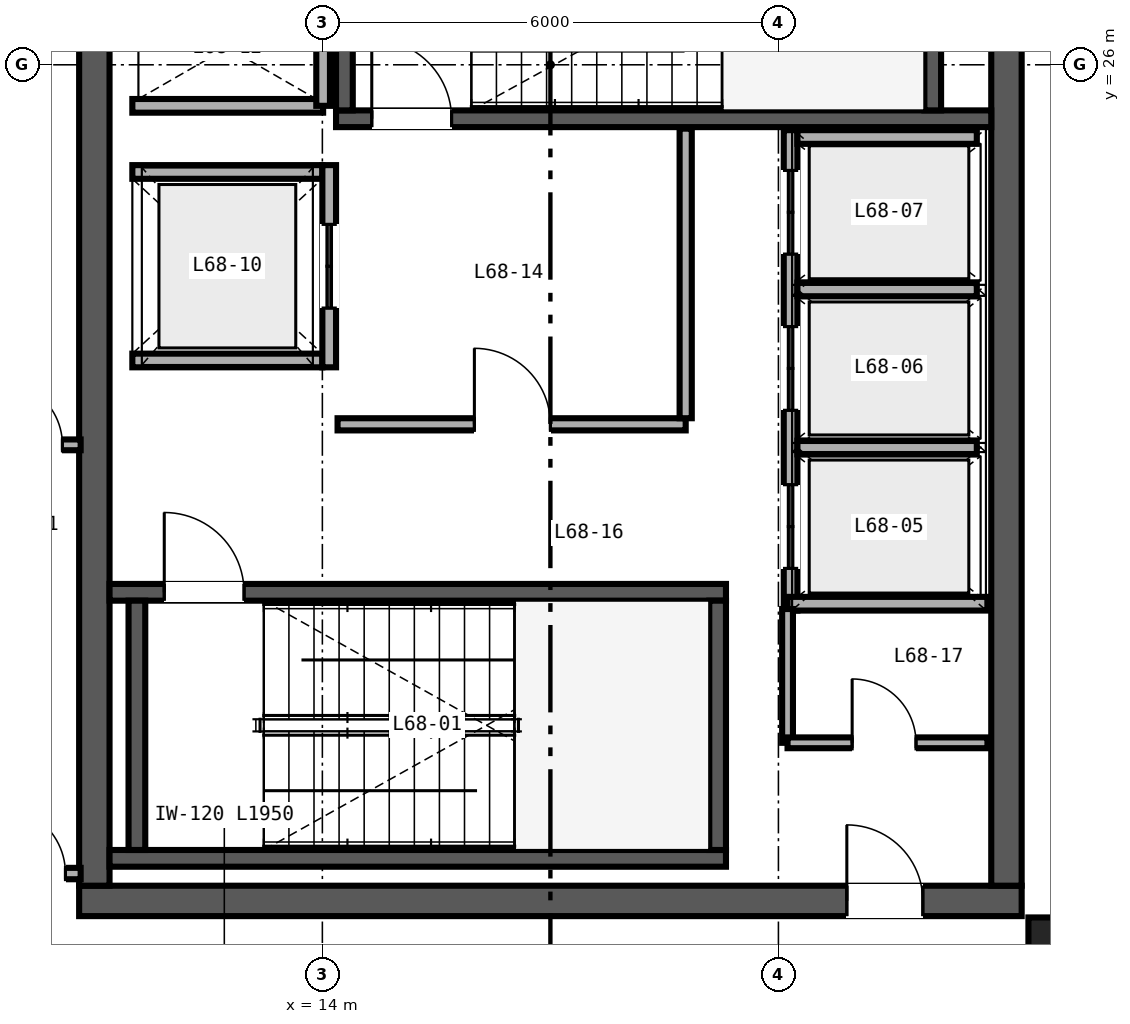
"""IFC4 building model, lengths in metres.
Left out: names, types, materials, properties, quantities, classifications, styles, units other than length and angle.
Written with IfcOpenShell. Run it as: python <this file> out.ifc"""

import sys

from ifc_helpers import new_model, si_unit, direction, frame, frame_2d, origin, origin_2d, place, context, subcontext, project, spatial, rectangle, i_section, extrude, source, transform, mapped, element, fill, save


model = new_model("IFC4")
c1 = context("Model", 3, precision=1e-05, world=origin(), true_north=direction((0.0, 1.0)))
c2 = subcontext(c1, "Body", "Model", "MODEL_VIEW")
j1 = project(units=[si_unit("LENGTHUNIT", "METRE"), si_unit("PLANEANGLEUNIT", "RADIAN")], contexts=[c1])
p1 = place(None, origin())
s1 = spatial("IfcSite", under=j1, at=p1, CompositionType="ELEMENT")
p2 = place(p1, origin())
s2 = spatial("IfcBuilding", under=s1, at=p2, CompositionType="ELEMENT")
p3 = place(p2, frame((0.0, 0.0, 268.8)))
s3 = spatial("IfcBuildingStorey", under=s2, at=p3, CompositionType="ELEMENT", Elevation=268.8)
p4 = place(p3, frame((10.8, 15.0, 0.0), z_axis=(0.0, 0.0, 1.0), x_axis=(1.0, 0.0, 0.0)))
e1 = element("IfcWall", 1, at=p4, inside=s3, PredefinedType="SHEAR", context=c2, shape_type="SweptSolid", body=[
    extrude(rectangle(XDim=12.4, YDim=0.4, at=frame_2d((6.2, 0.0))), origin(), (0.0, 0.0, 1.0), 3.28),
])
p5 = place(p4, frame((10.1, 0.0, 0.0)))
e2 = element("IfcOpeningElement", 2, at=p5, cuts=e1, PredefinedType="OPENING", context=c2, shape_type="SweptSolid", body=[
    extrude(rectangle(XDim=1.0, YDim=2.15, at=frame_2d((0.5, 1.075))), frame((0.0, 0.21, 0.0), z_axis=(0.0, -1.0, 0.0), x_axis=(1.0, 0.0, 0.0)), (0.0, 0.0, 1.0), 0.42),
])
for number, where, z_axis, x_axis in (
    (3, (11.0, 15.2, 0.0), (0.0, 0.0, 1.0), (0.0, 1.0, 0.0)),
    (4, (23.0, 15.2, 0.0), (0.0, 0.0, 1.0), (0.0, 1.0, 0.0)),
):
    element("IfcWall", number, at=place(p3, frame(where, z_axis=z_axis, x_axis=x_axis)), inside=s3, PredefinedType="SHEAR", context=c2, shape_type="SweptSolid", body=[
        extrude(rectangle(XDim=21.6, YDim=0.4, at=frame_2d((10.8, 0.0))), origin(), (0.0, 0.0, 1.0), 3.28),
    ])
p6 = place(p3, frame((11.2, 15.56, 0.0), z_axis=(0.0, 0.0, 1.0), x_axis=(1.0, 0.0, 0.0)))
e5 = element("IfcWall", 5, at=p6, inside=s3, PredefinedType="SHEAR", context=c2, shape_type="SweptSolid", body=[
    extrude(rectangle(XDim=8.11, YDim=0.22, at=frame_2d((4.055, 0.0))), origin(), (0.0, 0.0, 1.0), 3.4),
])
p7 = place(p3, frame((11.2, 19.06, 0.0), z_axis=(0.0, 0.0, 1.0), x_axis=(1.0, 0.0, 0.0)))
e6 = element("IfcWall", 6, at=p7, inside=s3, PredefinedType="SHEAR", context=c2, shape_type="SweptSolid", body=[
    extrude(rectangle(XDim=8.11, YDim=0.22, at=frame_2d((4.055, 0.0))), origin(), (0.0, 0.0, 1.0), 3.4),
])
p8 = place(p7, frame((0.72, 0.0, 0.0)))
e7 = element("IfcOpeningElement", 7, at=p8, cuts=e6, PredefinedType="OPENING", context=c2, shape_type="SweptSolid", body=[
    extrude(rectangle(XDim=1.05, YDim=2.15, at=frame_2d((0.525, 1.075))), frame((0.0, 0.12, 0.0), z_axis=(0.0, -1.0, 0.0), x_axis=(1.0, 0.0, 0.0)), (0.0, 0.0, 1.0), 0.24),
])
for number, where, z_axis, x_axis in (
    (8, (11.56, 15.67, 0.0), (0.0, 0.0, 1.0), (0.0, 1.0, 0.0)),
    (9, (19.2, 15.67, 0.0), (0.0, 0.0, 1.0), (0.0, 1.0, 0.0)),
):
    element("IfcWall", number, at=place(p3, frame(where, z_axis=z_axis, x_axis=x_axis)), inside=s3, PredefinedType="SHEAR", context=c2, shape_type="SweptSolid", body=[
        extrude(rectangle(XDim=3.28, YDim=0.22, at=frame_2d((1.64, 0.0))), origin(), (0.0, 0.0, 1.0), 3.4),
    ])
p9 = place(p3, frame((14.18, 25.29, 0.0), z_axis=(0.0, 0.0, 1.0), x_axis=(1.0, 0.0, 0.0)))
e10 = element("IfcWall", 10, at=p9, inside=s3, PredefinedType="SHEAR", context=c2, shape_type="SweptSolid", body=[
    extrude(rectangle(XDim=8.62, YDim=0.22, at=frame_2d((4.31, 0.0))), origin(), (0.0, 0.0, 1.0), 3.4),
])
p10 = place(p9, frame((0.47, 0.0, 0.0)))
e11 = element("IfcOpeningElement", 11, at=p10, cuts=e10, PredefinedType="OPENING", context=c2, shape_type="SweptSolid", body=[
    extrude(rectangle(XDim=1.05, YDim=2.15, at=frame_2d((0.525, 1.075))), frame((0.0, 0.12, 0.0), z_axis=(0.0, -1.0, 0.0), x_axis=(1.0, 0.0, 0.0)), (0.0, 0.0, 1.0), 0.24),
])
for number, where, z_axis, x_axis in (
    (12, (14.29, 25.4, 0.0), (0.0, 0.0, 1.0), (0.0, 1.0, 0.0)),
    (13, (22.03, 25.4, 0.0), (0.0, 0.0, 1.0), (0.0, 1.0, 0.0)),
):
    element("IfcWall", number, at=place(p3, frame(where, z_axis=z_axis, x_axis=x_axis)), inside=s3, PredefinedType="SHEAR", context=c2, shape_type="SweptSolid", body=[
        extrude(rectangle(XDim=3.28, YDim=0.22, at=frame_2d((1.64, 0.0))), origin(), (0.0, 0.0, 1.0), 3.4),
    ])
m1 = source(origin(), c2, "Body", "SweptSolid", [
    extrude(i_section(OverallWidth=0.422, OverallDepth=0.465, WebThickness=0.045, FlangeThickness=0.073, FilletRadius=0.025, at=origin_2d()), origin(), (0.0, 0.0, 1.0), 3.28),
])
p11 = place(p3, frame((23.5, 14.55, 0.0), z_axis=(0.0, 0.0, 1.0), x_axis=(1.0, 0.0, 0.0)))
e14 = element("IfcColumn", 14, at=p11, inside=s3, PredefinedType="COLUMN", context=c2, shape_type="MappedRepresentation", body=[
    mapped(m1, transform((0.0, 0.0, 0.0), scale=1.0)),
])
p12 = place(p3, frame((20.16, 18.82, 0.0), z_axis=(0.0, 0.0, 1.0), x_axis=(0.0, 1.0, 0.0)))
e15 = element("IfcWall", 15, at=p12, inside=s3, PredefinedType="SOLIDWALL", context=c2, shape_type="SweptSolid", body=[
    extrude(rectangle(XDim=6.32, YDim=0.18, at=frame_2d((3.16, 0.0))), origin(), (0.0, 0.0, 1.0), 2.38),
])
p13 = place(p12, frame((0.555, 0.0, 0.0)))
e16 = element("IfcOpeningElement", 16, at=p13, cuts=e15, PredefinedType="OPENING", context=c2, shape_type="SweptSolid", body=[
    extrude(rectangle(XDim=1.1, YDim=2.2, at=frame_2d((0.55, 1.1))), frame((0.0, 0.1, 0.0), z_axis=(0.0, -1.0, 0.0), x_axis=(1.0, 0.0, 0.0)), (0.0, 0.0, 1.0), 0.2),
])
p14 = place(p12, frame((2.635, 0.0, 0.0)))
e17 = element("IfcOpeningElement", 17, at=p14, cuts=e15, PredefinedType="OPENING", context=c2, shape_type="SweptSolid", body=[
    extrude(rectangle(XDim=1.1, YDim=2.2, at=frame_2d((0.55, 1.1))), frame((0.0, 0.1, 0.0), z_axis=(0.0, -1.0, 0.0), x_axis=(1.0, 0.0, 0.0)), (0.0, 0.0, 1.0), 0.2),
])
p15 = place(p12, frame((4.69, 0.0, 0.0)))
e18 = element("IfcOpeningElement", 18, at=p15, cuts=e15, PredefinedType="OPENING", context=c2, shape_type="SweptSolid", body=[
    extrude(rectangle(XDim=1.1, YDim=2.2, at=frame_2d((0.55, 1.1))), frame((0.0, 0.1, 0.0), z_axis=(0.0, -1.0, 0.0), x_axis=(1.0, 0.0, 0.0)), (0.0, 0.0, 1.0), 0.2),
])
p16 = place(p3, frame((20.12, 18.91, 0.0), z_axis=(0.0, 0.0, 1.0), x_axis=(1.0, 0.0, 0.0)))
e19 = element("IfcWall", 19, at=p16, inside=s3, PredefinedType="SOLIDWALL", context=c2, shape_type="SweptSolid", body=[
    extrude(rectangle(XDim=2.63, YDim=0.18, at=frame_2d((1.315, 0.0))), origin(), (0.0, 0.0, 1.0), 3.28),
])
p17 = place(p3, frame((20.25, 25.05, 0.0), z_axis=(0.0, 0.0, 1.0), x_axis=(1.0, 0.0, 0.0)))
e20 = element("IfcWall", 20, at=p17, inside=s3, PredefinedType="SOLIDWALL", context=c2, shape_type="SweptSolid", body=[
    extrude(rectangle(XDim=2.36, YDim=0.18, at=frame_2d((1.18, 0.0))), origin(), (0.0, 0.0, 1.0), 3.28),
])
p18 = place(p3, frame((20.25, 20.965, 0.0), z_axis=(0.0, 0.0, 1.0), x_axis=(1.0, 0.0, 0.0)))
e21 = element("IfcWall", 21, at=p18, inside=s3, PredefinedType="SOLIDWALL", context=c2, shape_type="SweptSolid", body=[
    extrude(rectangle(XDim=2.36, YDim=0.18, at=frame_2d((1.18, 0.0))), origin(), (0.0, 0.0, 1.0), 2.38),
])
p19 = place(p3, frame((20.25, 23.045, 0.0), z_axis=(0.0, 0.0, 1.0), x_axis=(1.0, 0.0, 0.0)))
e22 = element("IfcWall", 22, at=p19, inside=s3, PredefinedType="SOLIDWALL", context=c2, shape_type="SweptSolid", body=[
    extrude(rectangle(XDim=2.36, YDim=0.18, at=frame_2d((1.18, 0.0))), origin(), (0.0, 0.0, 1.0), 3.28),
])
for number, where, z_axis, x_axis in (
    (23, (11.5, 22.11, 0.0), (0.0, 0.0, 1.0), (1.0, 0.0, 0.0)),
    (24, (11.5, 24.59, 0.0), (0.0, 0.0, 1.0), (1.0, 0.0, 0.0)),
):
    element("IfcWall", number, at=place(p3, frame(where, z_axis=z_axis, x_axis=x_axis)), inside=s3, PredefinedType="SOLIDWALL", context=c2, shape_type="SweptSolid", body=[
        extrude(rectangle(XDim=2.5, YDim=0.18, at=frame_2d((1.25, 0.0))), origin(), (0.0, 0.0, 1.0), 3.28),
    ])
p20 = place(p3, frame((14.09, 22.02, 0.0), z_axis=(0.0, 0.0, 1.0), x_axis=(0.0, 1.0, 0.0)))
e25 = element("IfcWall", 25, at=p20, inside=s3, PredefinedType="SOLIDWALL", context=c2, shape_type="SweptSolid", body=[
    extrude(rectangle(XDim=2.66, YDim=0.18, at=frame_2d((1.33, 0.0))), origin(), (0.0, 0.0, 1.0), 3.28),
])
p21 = place(p20, frame((0.78, 0.0, 0.0)))
e26 = element("IfcOpeningElement", 26, at=p21, cuts=e25, PredefinedType="OPENING", context=c2, shape_type="SweptSolid", body=[
    extrude(rectangle(XDim=1.1, YDim=2.2, at=frame_2d((0.55, 1.1))), frame((0.0, 0.1, 0.0), z_axis=(0.0, -1.0, 0.0), x_axis=(1.0, 0.0, 0.0)), (0.0, 0.0, 1.0), 0.2),
])
p22 = place(p3, frame((11.5, 25.46, 0.0), z_axis=(0.0, 0.0, 1.0), x_axis=(1.0, 0.0, 0.0)))
e27 = element("IfcWall", 27, at=p22, inside=s3, PredefinedType="SOLIDWALL", context=c2, shape_type="SweptSolid", body=[
    extrude(rectangle(XDim=2.51, YDim=0.18, at=frame_2d((1.255, 0.0))), origin(), (0.0, 0.0, 1.0), 3.28),
])
p23 = place(p3, frame((14.01, 25.46, 0.0), z_axis=(0.0, 0.0, 1.0), x_axis=(0.0, 1.0, 0.0)))
e28 = element("IfcWall", 28, at=p23, inside=s3, PredefinedType="SOLIDWALL", context=c2, shape_type="SweptSolid", body=[
    extrude(rectangle(XDim=3.08, YDim=0.18, at=frame_2d((1.54, 0.0))), origin(), (0.0, 0.0, 1.0), 3.28),
])
p24 = place(p3, frame((14.2, 21.27, 0.0), z_axis=(0.0, 0.0, 1.0), x_axis=(1.0, 0.0, 0.0)))
e29 = element("IfcWall", 29, at=p24, inside=s3, PredefinedType="PARTITIONING", context=c2, shape_type="SweptSolid", body=[
    extrude(rectangle(XDim=4.58, YDim=0.16, at=frame_2d((2.29, 0.0))), origin(), (0.0, 0.0, 1.0), 3.28),
])
p25 = place(p24, frame((1.8, 0.0, 0.0)))
e30 = element("IfcOpeningElement", 30, at=p25, cuts=e29, PredefinedType="OPENING", context=c2, shape_type="SweptSolid", body=[
    extrude(rectangle(XDim=1.0, YDim=2.15, at=frame_2d((0.5, 1.075))), frame((0.0, 0.09, 0.0), z_axis=(0.0, -1.0, 0.0), x_axis=(1.0, 0.0, 0.0)), (0.0, 0.0, 1.0), 0.18),
])
p26 = place(p3, frame((18.78, 21.35, 0.0), z_axis=(0.0, 0.0, 1.0), x_axis=(0.0, 1.0, 0.0)))
e31 = element("IfcWall", 31, at=p26, inside=s3, PredefinedType="PARTITIONING", context=c2, shape_type="SweptSolid", body=[
    extrude(rectangle(XDim=3.81, YDim=0.16, at=frame_2d((1.905, 0.0))), origin(), (0.0, 0.0, 1.0), 3.28),
])
p27 = place(p3, frame((20.12, 17.08, 0.0), z_axis=(0.0, 0.0, 1.0), x_axis=(0.0, 1.0, 0.0)))
e32 = element("IfcWall", 32, at=p27, inside=s3, PredefinedType="PARTITIONING", context=c2, shape_type="SweptSolid", body=[
    extrude(rectangle(XDim=1.76, YDim=0.142, at=frame_2d((0.88, 0.0))), origin(), (0.0, 0.0, 1.0), 3.28),
])
p28 = place(p3, frame((20.12, 17.08, 0.0), z_axis=(0.0, 0.0, 1.0), x_axis=(1.0, 0.0, 0.0)))
e33 = element("IfcWall", 33, at=p28, inside=s3, PredefinedType="PARTITIONING", context=c2, shape_type="SweptSolid", body=[
    extrude(rectangle(XDim=2.63, YDim=0.142, at=frame_2d((1.315, 0.0))), origin(), (0.0, 0.0, 1.0), 3.28),
])
p29 = place(p28, frame((0.85, 0.0, 0.0)))
e34 = element("IfcOpeningElement", 34, at=p29, cuts=e33, PredefinedType="OPENING", context=c2, shape_type="SweptSolid", body=[
    extrude(rectangle(XDim=0.84, YDim=2.1, at=frame_2d((0.42, 1.05))), frame((0.0, 0.081, 0.0), z_axis=(0.0, -1.0, 0.0), x_axis=(1.0, 0.0, 0.0)), (0.0, 0.0, 1.0), 0.162),
])
p30 = place(p3, frame((8.16, 15.36, 0.0), z_axis=(0.0, 0.0, 1.0), x_axis=(1.0, 0.0, 0.0)))
e35 = element("IfcWall", 35, at=p30, inside=s3, PredefinedType="PARTITIONING", context=c2, shape_type="SweptSolid", body=[
    extrude(rectangle(XDim=2.66, YDim=0.15, at=frame_2d((1.33, 0.0))), origin(), (0.0, 0.0, 1.0), 2.501),
])
p31 = place(p30, frame((1.58, 0.0, 0.0)))
e36 = element("IfcOpeningElement", 36, at=p31, cuts=e35, PredefinedType="OPENING", context=c2, shape_type="SweptSolid", body=[
    extrude(rectangle(XDim=0.88, YDim=2.15, at=frame_2d((0.44, 1.075))), frame((0.0, 0.085, 0.0), z_axis=(0.0, -1.0, 0.0), x_axis=(1.0, 0.0, 0.0)), (0.0, 0.0, 1.0), 0.17),
])
p32 = place(p3, frame((8.16, 21.0, 0.0), z_axis=(0.0, 0.0, 1.0), x_axis=(1.0, 0.0, 0.0)))
e37 = element("IfcWall", 37, at=p32, inside=s3, PredefinedType="PARTITIONING", context=c2, shape_type="SweptSolid", body=[
    extrude(rectangle(XDim=2.66, YDim=0.142, at=frame_2d((1.33, 0.0))), origin(), (0.0, 0.0, 1.0), 2.38),
])
p33 = place(p32, frame((1.58, 0.0, 0.0)))
e38 = element("IfcOpeningElement", 38, at=p33, cuts=e37, PredefinedType="OPENING", context=c2, shape_type="SweptSolid", body=[
    extrude(rectangle(XDim=0.84, YDim=2.1, at=frame_2d((0.42, 1.05))), frame((0.0, 0.081, 0.0), z_axis=(0.0, -1.0, 0.0), x_axis=(1.0, 0.0, 0.0)), (0.0, 0.0, 1.0), 0.162),
])
m2 = source(origin(), c2, "Body", "SweptSolid", [
    extrude(rectangle(XDim=1.05, YDim=2.15, at=frame_2d((0.525, 1.075))), frame((0.0, 0.025, 0.0), z_axis=(0.0, -1.0, 0.0), x_axis=(1.0, 0.0, 0.0)), (0.0, 0.0, 1.0), 0.05),
])
p34 = place(p8, origin())
e39 = element("IfcDoor", 39, at=p34, inside=s3, OperationType="SINGLE_SWING_LEFT", PredefinedType="DOOR", context=c2, shape_type="MappedRepresentation", body=[
    mapped(m2, transform((0.0, 0.0, 0.0), scale=1.0)),
])
fill(e7, e39)
p35 = place(p10, origin())
e40 = element("IfcDoor", 40, at=p35, inside=s3, OperationType="SINGLE_SWING_LEFT", PredefinedType="DOOR", context=c2, shape_type="MappedRepresentation", body=[
    mapped(m2, transform((0.0, 0.0, 0.0), scale=1.0)),
])
fill(e11, e40)
m3 = source(origin(), c2, "Body", "SweptSolid", [
    extrude(rectangle(XDim=1.1, YDim=2.2, at=frame_2d((0.55, 1.1))), frame((0.0, 0.025, 0.0), z_axis=(0.0, -1.0, 0.0), x_axis=(1.0, 0.0, 0.0)), (0.0, 0.0, 1.0), 0.05),
])
p36 = place(p13, origin())
e41 = element("IfcDoor", 41, at=p36, inside=s3, OperationType="DOUBLE_DOOR_SLIDING", PredefinedType="DOOR", context=c2, shape_type="MappedRepresentation", body=[
    mapped(m3, transform((0.0, 0.0, 0.0), scale=1.0)),
])
fill(e16, e41)
p37 = place(p14, origin())
e42 = element("IfcDoor", 42, at=p37, inside=s3, OperationType="DOUBLE_DOOR_SLIDING", PredefinedType="DOOR", context=c2, shape_type="MappedRepresentation", body=[
    mapped(m3, transform((0.0, 0.0, 0.0), scale=1.0)),
])
fill(e17, e42)
p38 = place(p15, origin())
e43 = element("IfcDoor", 43, at=p38, inside=s3, OperationType="DOUBLE_DOOR_SLIDING", PredefinedType="DOOR", context=c2, shape_type="MappedRepresentation", body=[
    mapped(m3, transform((0.0, 0.0, 0.0), scale=1.0)),
])
fill(e18, e43)
p39 = place(p21, origin())
e44 = element("IfcDoor", 44, at=p39, inside=s3, OperationType="DOUBLE_DOOR_SLIDING", PredefinedType="DOOR", context=c2, shape_type="MappedRepresentation", body=[
    mapped(m3, transform((0.0, 0.0, 0.0), scale=1.0)),
])
fill(e26, e44)
m4 = source(origin(), c2, "Body", "SweptSolid", [
    extrude(rectangle(XDim=1.0, YDim=2.15, at=frame_2d((0.5, 1.075))), frame((0.0, 0.025, 0.0), z_axis=(0.0, -1.0, 0.0), x_axis=(1.0, 0.0, 0.0)), (0.0, 0.0, 1.0), 0.05),
])
p40 = place(p25, origin())
e45 = element("IfcDoor", 45, at=p40, inside=s3, OperationType="SINGLE_SWING_LEFT", PredefinedType="DOOR", context=c2, shape_type="MappedRepresentation", body=[
    mapped(m4, transform((0.0, 0.0, 0.0), scale=1.0)),
])
fill(e30, e45)
m5 = source(origin(), c2, "Body", "SweptSolid", [
    extrude(rectangle(XDim=0.84, YDim=2.1, at=frame_2d((0.42, 1.05))), frame((0.0, 0.025, 0.0), z_axis=(0.0, -1.0, 0.0), x_axis=(1.0, 0.0, 0.0)), (0.0, 0.0, 1.0), 0.05),
])
p41 = place(p29, origin())
e46 = element("IfcDoor", 46, at=p41, inside=s3, OperationType="SINGLE_SWING_LEFT", PredefinedType="DOOR", context=c2, shape_type="MappedRepresentation", body=[
    mapped(m5, transform((0.0, 0.0, 0.0), scale=1.0)),
])
fill(e34, e46)
p42 = place(p5, origin())
e47 = element("IfcDoor", 47, at=p42, inside=s3, OperationType="SINGLE_SWING_LEFT", PredefinedType="DOOR", context=c2, shape_type="MappedRepresentation", body=[
    mapped(m4, transform((0.0, 0.0, 0.0), scale=1.0)),
])
fill(e2, e47)
m6 = source(origin(), c2, "Body", "SweptSolid", [
    extrude(rectangle(XDim=0.88, YDim=2.15, at=frame_2d((0.44, 1.075))), frame((0.0, 0.025, 0.0), z_axis=(0.0, -1.0, 0.0), x_axis=(1.0, 0.0, 0.0)), (0.0, 0.0, 1.0), 0.05),
])
p43 = place(p31, origin())
e48 = element("IfcDoor", 48, at=p43, inside=s3, OperationType="SINGLE_SWING_LEFT", PredefinedType="DOOR", context=c2, shape_type="MappedRepresentation", body=[
    mapped(m6, transform((0.0, 0.0, 0.0), scale=1.0)),
])
fill(e36, e48)
p44 = place(p33, origin())
e49 = element("IfcDoor", 49, at=p44, inside=s3, OperationType="SINGLE_SWING_LEFT", PredefinedType="DOOR", context=c2, shape_type="MappedRepresentation", body=[
    mapped(m5, transform((0.0, 0.0, 0.0), scale=1.0)),
])
fill(e38, e49)
save(model, sys.argv[1])
